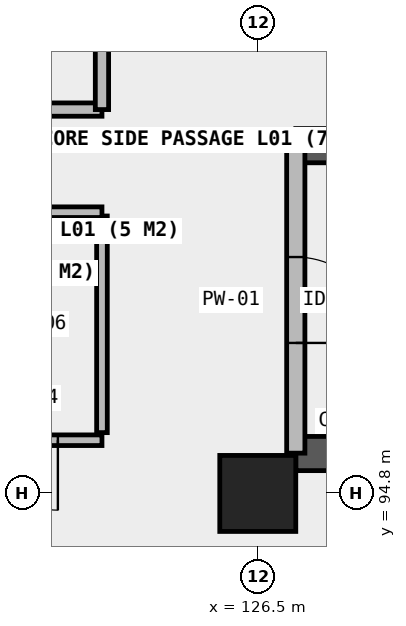
"""IFC4 building model, lengths in metres.
Left out: names, types, materials, properties, quantities, classifications, styles, units other than length and angle.
Written with IfcOpenShell. Run it as: python <this file> out.ifc"""

import sys

from ifc_helpers import new_model, si_unit, direction, frame, frame_2d, origin, origin_2d, place, context, subcontext, project, spatial, rectangle, extrude, element, fill, save


model = new_model("IFC4")
c1 = context("Model", 3, precision=1e-05, world=origin(), true_north=direction((0.0, 1.0)))
c2 = subcontext(c1, "Body", "Model", "MODEL_VIEW")
j1 = project(units=[si_unit("LENGTHUNIT", "METRE"), si_unit("PLANEANGLEUNIT", "RADIAN")], contexts=[c1])
p1 = place(None, origin())
s1 = spatial("IfcSite", under=j1, at=p1, CompositionType="ELEMENT")
p2 = place(p1, origin())
s2 = spatial("IfcBuilding", under=s1, at=p2, CompositionType="ELEMENT")
p3 = place(p2, frame((0.0, 0.0, 4.2)))
s3 = spatial("IfcBuildingStorey", under=s2, at=p3, CompositionType="ELEMENT", Elevation=4.2)
p4 = place(p3, frame((126.5, 94.8, 0.0), z_axis=(0.0, 0.0, 1.0), x_axis=(1.0, 0.0, 0.0)))
e1 = element("IfcColumn", 1, at=p4, inside=s3, PredefinedType="COLUMN", context=c2, shape_type="SweptSolid", body=[
    extrude(rectangle(XDim=1.0, YDim=1.0, at=origin_2d()), origin(), (0.0, 0.0, 1.0), 4.2),
])
p5 = place(p3, frame((127.0, 95.325, 0.0), z_axis=(0.0, 0.0, 1.0), x_axis=(1.0, 0.0, 0.0)))
e2 = element("IfcWall", 2, at=p5, inside=s3, PredefinedType="SHEAR", context=c2, shape_type="SweptSolid", body=[
    extrude(rectangle(XDim=9.15, YDim=0.45, at=frame_2d((4.575, 0.0))), origin(), (0.0, 0.0, 1.0), 4.2),
])
p6 = place(p3, frame((127.0, 99.375, 0.0), z_axis=(0.0, 0.0, 1.0), x_axis=(1.0, 0.0, 0.0)))
e3 = element("IfcWall", 3, at=p6, inside=s3, PredefinedType="SHEAR", context=c2, shape_type="SweptSolid", body=[
    extrude(rectangle(XDim=9.15, YDim=0.45, at=frame_2d((4.575, 0.0))), origin(), (0.0, 0.0, 1.0), 4.2),
])
p7 = place(p6, frame((0.55, 0.0, 0.0)))
e4 = element("IfcOpeningElement", 4, at=p7, cuts=e3, PredefinedType="OPENING", context=c2, shape_type="SweptSolid", body=[
    extrude(rectangle(XDim=1.13, YDim=2.15, at=frame_2d((0.565, 1.075))), frame((0.0, 0.235, 0.0), z_axis=(0.0, -1.0, 0.0), x_axis=(1.0, 0.0, 0.0)), (0.0, 0.0, 1.0), 0.47),
])
p8 = place(p3, frame((127.0, 95.33, 0.0), z_axis=(0.0, 0.0, 1.0), x_axis=(0.0, 1.0, 0.0)))
e5 = element("IfcWall", 5, at=p8, inside=s3, PredefinedType="SOLIDWALL", context=c2, shape_type="SweptSolid", body=[
    extrude(rectangle(XDim=4.04, YDim=0.24, at=frame_2d((2.02, 0.0))), origin(), (0.0, 0.0, 1.0), 3.84),
])
p9 = place(p8, frame((1.45, 0.0, 0.0)))
e6 = element("IfcOpeningElement", 6, at=p9, cuts=e5, PredefinedType="OPENING", context=c2, shape_type="SweptSolid", body=[
    extrude(rectangle(XDim=1.13, YDim=2.15, at=frame_2d((0.565, 1.075))), frame((0.0, 0.13, 0.0), z_axis=(0.0, -1.0, 0.0), x_axis=(1.0, 0.0, 0.0)), (0.0, 0.0, 1.0), 0.26),
])
p10 = place(p3, frame((118.15, 95.5, 0.0), z_axis=(0.0, 0.0, 1.0), x_axis=(1.0, 0.0, 0.0)))
e7 = element("IfcWall", 7, at=p10, inside=s3, PredefinedType="PLUMBINGWALL", context=c2, shape_type="SweptSolid", body=[
    extrude(rectangle(XDim=6.3, YDim=0.14, at=frame_2d((3.15, 0.0))), origin(), (0.0, 0.0, 1.0), 3.84),
])
p11 = place(p10, frame((0.72, 0.0, 0.0)))
e8 = element("IfcOpeningElement", 8, at=p11, cuts=e7, PredefinedType="OPENING", context=c2, shape_type="SweptSolid", body=[
    extrude(rectangle(XDim=0.95, YDim=2.1, at=frame_2d((0.475, 1.05))), frame((0.0, 0.08, 0.0), z_axis=(0.0, -1.0, 0.0), x_axis=(1.0, 0.0, 0.0)), (0.0, 0.0, 1.0), 0.16),
])
p12 = place(p10, frame((2.8, 0.0, 0.0)))
e9 = element("IfcOpeningElement", 9, at=p12, cuts=e7, PredefinedType="OPENING", context=c2, shape_type="SweptSolid", body=[
    extrude(rectangle(XDim=0.92, YDim=2.1, at=frame_2d((0.46, 1.05))), frame((0.0, 0.08, 0.0), z_axis=(0.0, -1.0, 0.0), x_axis=(1.0, 0.0, 0.0)), (0.0, 0.0, 1.0), 0.16),
])
p13 = place(p10, frame((4.8, 0.0, 0.0)))
e10 = element("IfcOpeningElement", 10, at=p13, cuts=e7, PredefinedType="OPENING", context=c2, shape_type="SweptSolid", body=[
    extrude(rectangle(XDim=0.92, YDim=2.1, at=frame_2d((0.46, 1.05))), frame((0.0, 0.08, 0.0), z_axis=(0.0, -1.0, 0.0), x_axis=(1.0, 0.0, 0.0)), (0.0, 0.0, 1.0), 0.16),
])
p14 = place(p3, frame((124.45, 95.6, 0.0), z_axis=(0.0, 0.0, 1.0), x_axis=(0.0, 1.0, 0.0)))
e11 = element("IfcWall", 11, at=p14, inside=s3, PredefinedType="PLUMBINGWALL", context=c2, shape_type="SweptSolid", body=[
    extrude(rectangle(XDim=2.85, YDim=0.14, at=frame_2d((1.425, 0.0))), origin(), (0.0, 0.0, 1.0), 3.84),
])
p15 = place(p3, frame((118.15, 98.5, 0.0), z_axis=(0.0, 0.0, 1.0), x_axis=(1.0, 0.0, 0.0)))
e12 = element("IfcWall", 12, at=p15, inside=s3, PredefinedType="PLUMBINGWALL", context=c2, shape_type="SweptSolid", body=[
    extrude(rectangle(XDim=6.3, YDim=0.14, at=frame_2d((3.15, 0.0))), origin(), (0.0, 0.0, 1.0), 3.84),
])
p16 = place(p3, frame((115.16, 99.85, 0.0), z_axis=(0.0, 0.0, 1.0), x_axis=(1.0, 0.0, 0.0)))
e13 = element("IfcWall", 13, at=p16, inside=s3, PredefinedType="PARTITIONING", context=c2, shape_type="SweptSolid", body=[
    extrude(rectangle(XDim=9.29, YDim=0.175, at=frame_2d((4.645, 0.0))), origin(), (0.0, 0.0, 1.0), 3.84),
])
p17 = place(p16, frame((3.64, 0.0, 0.0)))
e14 = element("IfcOpeningElement", 14, at=p17, cuts=e13, PredefinedType="OPENING", context=c2, shape_type="SweptSolid", body=[
    extrude(rectangle(XDim=1.3, YDim=2.2, at=frame_2d((0.65, 1.1))), frame((0.0, 0.098, 0.0), z_axis=(0.0, -1.0, 0.0), x_axis=(1.0, 0.0, 0.0)), (0.0, 0.0, 1.0), 0.195),
])
p18 = place(p3, frame((124.45, 99.85, 0.0), z_axis=(0.0, 0.0, 1.0), x_axis=(0.0, 1.0, 0.0)))
e15 = element("IfcWall", 15, at=p18, inside=s3, PredefinedType="PARTITIONING", context=c2, shape_type="SweptSolid", body=[
    extrude(rectangle(XDim=14.55, YDim=0.175, at=frame_2d((7.275, 0.0))), origin(), (0.0, 0.0, 1.0), 3.84),
])
p19 = place(p9, frame((0.565, 0.0, 0.0), z_axis=(0.0, 0.0, 1.0), x_axis=(-1.0, 0.0, 0.0)))
e16 = element("IfcDoor", 16, at=p19, inside=s3, OperationType="SINGLE_SWING_LEFT", PredefinedType="DOOR", context=c2, shape_type="SweptSolid", body=[
    extrude(rectangle(XDim=1.13, YDim=2.15, at=frame_2d((0.0, 1.075))), frame((0.0, 0.025, 0.0), z_axis=(0.0, -1.0, 0.0), x_axis=(1.0, 0.0, 0.0)), (0.0, 0.0, 1.0), 0.05),
])
fill(e6, e16)
p20 = place(p13, origin())
e17 = element("IfcDoor", 17, at=p20, inside=s3, OperationType="SINGLE_SWING_RIGHT", PredefinedType="DOOR", context=c2, shape_type="SweptSolid", body=[
    extrude(rectangle(XDim=0.92, YDim=2.1, at=frame_2d((0.46, 1.05))), frame((0.0, 0.025, 0.0), z_axis=(0.0, -1.0, 0.0), x_axis=(1.0, 0.0, 0.0)), (0.0, 0.0, 1.0), 0.05),
])
fill(e10, e17)
save(model, sys.argv[1])
